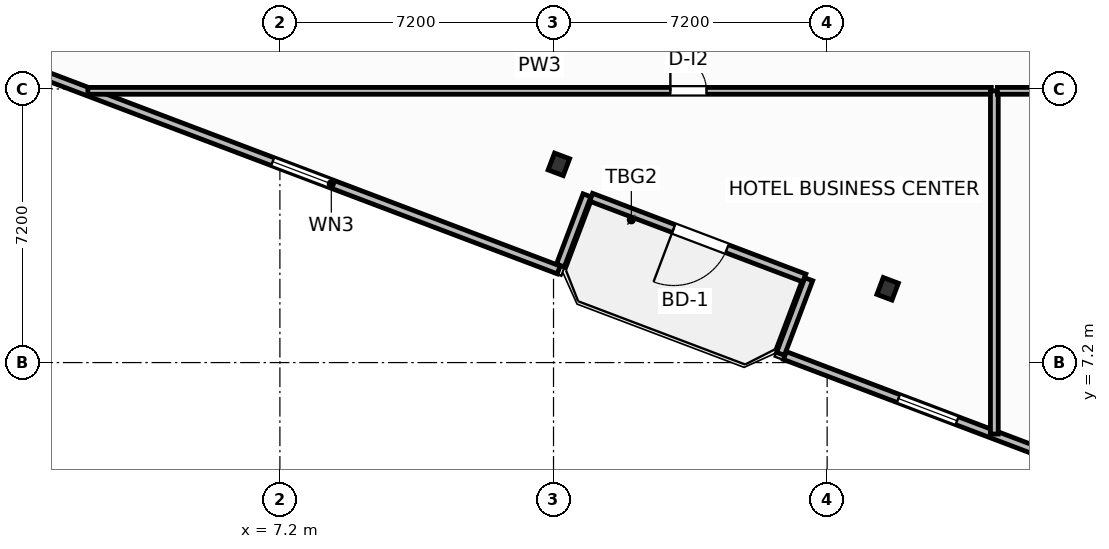
"""IFC4 building model, lengths in metres.
Left out: names, types, materials, properties, quantities, classifications, styles, units other than length and angle.
Written with IfcOpenShell. Run it as: python <this file> out.ifc"""

import sys

from ifc_helpers import new_model, si_unit, direction, frame, frame_2d, origin, origin_2d, place, context, subcontext, project, spatial, rectangle, i_section, extrude, element, fill, save


model = new_model("IFC4")
c1 = context("Model", 3, precision=1e-05, world=origin(), true_north=direction((0.0, 1.0)))
c2 = subcontext(c1, "Body", "Model", "MODEL_VIEW")
j1 = project(units=[si_unit("LENGTHUNIT", "METRE"), si_unit("PLANEANGLEUNIT", "RADIAN")], contexts=[c1])
p1 = place(None, origin())
s1 = spatial("IfcSite", under=j1, at=p1, CompositionType="ELEMENT")
p2 = place(p1, origin())
s2 = spatial("IfcBuilding", under=s1, at=p2, CompositionType="ELEMENT")
p3 = place(p2, frame((0.0, 0.0, 94.7)))
s3 = spatial("IfcBuildingStorey", under=s2, at=p3, CompositionType="ELEMENT", Elevation=94.7)
for number, where, z_axis, x_axis in (
    (1, (14.541, 12.416, 0.0), (0.0, 0.0, 1.0), (0.935, -0.354, 0.0)),
    (2, (23.192, 9.141, 0.0), (0.0, 0.0, 1.0), (0.935, -0.354, 0.0)),
):
    element("IfcColumn", number, at=place(p3, frame(where, z_axis=z_axis, x_axis=x_axis)), inside=s3, PredefinedType="COLUMN", context=c2, shape_type="SweptSolid", body=[
        extrude(i_section(OverallWidth=0.424, OverallDepth=0.474, WebThickness=0.048, FlangeThickness=0.077, FilletRadius=0.025, at=origin_2d()), origin(), (0.0, 0.0, 1.0), 3.7),
    ])
p4 = place(p3, frame((21.0, 9.425, 0.0), z_axis=(0.0, 0.0, 1.0), x_axis=(-0.93521416643, 0.354082565101, 0.0)))
e3 = element("IfcWall", 3, at=p4, inside=s3, PredefinedType="SOLIDWALL", context=c2, shape_type="SweptSolid", body=[
    extrude(rectangle(XDim=6.0, YDim=0.22, at=frame_2d((3.0, 0.0))), origin(), (0.0, 0.0, 1.0), 2.73),
])
p5 = place(p4, frame((2.176, 0.0, 0.0)))
e4 = element("IfcOpeningElement", 4, at=p5, cuts=e3, PredefinedType="OPENING", context=c2, shape_type="SweptSolid", body=[
    extrude(rectangle(XDim=1.5, YDim=2.25, at=frame_2d((0.75, 1.125))), frame((0.0, 0.12, 0.0), z_axis=(0.0, -1.0, 0.0), x_axis=(1.0, 0.0, 0.0)), (0.0, 0.0, 1.0), 0.24),
])
p6 = place(p3, frame((1.026, 14.753, 0.0), z_axis=(0.0, 0.0, 1.0), x_axis=(0.935222448475, -0.354060689526, 0.0)))
e5 = element("IfcWall", 5, at=p6, inside=s3, PredefinedType="SOLIDWALL", context=c2, shape_type="SweptSolid", body=[
    extrude(rectangle(XDim=14.447, YDim=0.22, at=frame_2d((7.224, 0.0))), origin(), (0.0, 0.0, 1.0), 2.73),
])
p7 = place(p6, frame((6.399, 0.0, 0.8)))
e6 = element("IfcOpeningElement", 6, at=p7, cuts=e5, PredefinedType="OPENING", context=c2, shape_type="SweptSolid", body=[
    extrude(rectangle(XDim=1.65, YDim=1.65, at=frame_2d((0.825, 0.825))), frame((0.0, 0.12, 0.0), z_axis=(0.0, -1.0, 0.0), x_axis=(1.0, 0.0, 0.0)), (0.0, 0.0, 1.0), 0.24),
])
p8 = place(p3, frame((14.581, 9.755, 0.0), z_axis=(0.0, 0.0, 1.0), x_axis=(0.354061611705, 0.935222099352, 0.0)))
e7 = element("IfcWall", 7, at=p8, inside=s3, PredefinedType="SOLIDWALL", context=c2, shape_type="SweptSolid", body=[
    extrude(rectangle(XDim=1.975, YDim=0.22, at=frame_2d((0.987, 0.0))), origin(), (0.0, 0.0, 1.0), 2.73),
])
p9 = place(p3, frame((21.116, 9.392, 0.0), z_axis=(0.0, 0.0, 1.0), x_axis=(-0.353988291547, -0.935249854022, 0.0)))
e8 = element("IfcWall", 8, at=p9, inside=s3, PredefinedType="SOLIDWALL", context=c2, shape_type="SweptSolid", body=[
    extrude(rectangle(XDim=2.1, YDim=0.22, at=frame_2d((1.05, 0.0))), origin(), (0.0, 0.0, 1.0), 2.73),
])
p10 = place(p3, frame((20.49, 7.384, 0.0), z_axis=(0.0, 0.0, 1.0), x_axis=(0.935230796934, -0.354038636968, 0.0)))
e9 = element("IfcWall", 9, at=p10, inside=s3, PredefinedType="SOLIDWALL", context=c2, shape_type="SweptSolid", body=[
    extrude(rectangle(XDim=8.035, YDim=0.22, at=frame_2d((4.018, 0.0))), origin(), (0.0, 0.0, 1.0), 2.73),
])
p11 = place(p10, frame((3.192, 0.0, 0.8)))
e10 = element("IfcOpeningElement", 10, at=p11, cuts=e9, PredefinedType="OPENING", context=c2, shape_type="SweptSolid", body=[
    extrude(rectangle(XDim=1.65, YDim=1.65, at=frame_2d((0.825, 0.825))), frame((0.0, 0.12, 0.0), z_axis=(0.0, -1.0, 0.0), x_axis=(1.0, 0.0, 0.0)), (0.0, 0.0, 1.0), 0.24),
])
p12 = place(p3, frame((2.146, 14.35, 0.0), z_axis=(0.0, 0.0, 1.0), x_axis=(1.0, 0.0, 0.0)))
e11 = element("IfcWall", 11, at=p12, inside=s3, PredefinedType="PARTITIONING", context=c2, shape_type="SweptSolid", body=[
    extrude(rectangle(XDim=23.774, YDim=0.18, at=frame_2d((11.887, 0.0))), origin(), (0.0, 0.0, 1.0), 3.45),
])
p13 = place(p12, frame((15.329, 0.0, 0.0)))
e12 = element("IfcOpeningElement", 12, at=p13, cuts=e11, PredefinedType="OPENING", context=c2, shape_type="SweptSolid", body=[
    extrude(rectangle(XDim=0.95, YDim=2.05, at=frame_2d((0.475, 1.025))), frame((0.0, 0.1, 0.0), z_axis=(0.0, -1.0, 0.0), x_axis=(1.0, 0.0, 0.0)), (0.0, 0.0, 1.0), 0.2),
])
p14 = place(p3, frame((26.0, 5.319, 0.0), z_axis=(0.0, 0.0, 1.0), x_axis=(0.0, 1.0, 0.0)))
e13 = element("IfcWall", 13, at=p14, inside=s3, PredefinedType="PARTITIONING", context=c2, shape_type="SweptSolid", body=[
    extrude(rectangle(XDim=9.031, YDim=0.205, at=frame_2d((4.515, 0.0))), origin(), (0.0, 0.0, 1.0), 3.45),
])
p15 = place(p3, frame((26.08, 14.35, 0.0), z_axis=(0.0, 0.0, 1.0), x_axis=(1.0, 0.0, 0.0)))
e14 = element("IfcWall", 14, at=p15, inside=s3, PredefinedType="PARTITIONING", context=c2, shape_type="SweptSolid", body=[
    extrude(rectangle(XDim=17.84, YDim=0.18, at=frame_2d((8.92, 0.0))), origin(), (0.0, 0.0, 1.0), 3.45),
])
p16 = place(p15, frame((8.445, 0.0, 0.0)))
e15 = element("IfcOpeningElement", 15, at=p16, cuts=e14, PredefinedType="OPENING", context=c2, shape_type="SweptSolid", body=[
    extrude(rectangle(XDim=0.95, YDim=2.05, at=frame_2d((0.475, 1.025))), frame((0.0, 0.1, 0.0), z_axis=(0.0, -1.0, 0.0), x_axis=(1.0, 0.0, 0.0)), (0.0, 0.0, 1.0), 0.2),
])
p17 = place(p5, origin())
e16 = element("IfcDoor", 16, at=p17, inside=s3, OperationType="SINGLE_SWING_RIGHT", PredefinedType="DOOR", context=c2, shape_type="SweptSolid", body=[
    extrude(rectangle(XDim=1.5, YDim=2.25, at=frame_2d((0.75, 1.125))), frame((0.0, 0.025, 0.0), z_axis=(0.0, -1.0, 0.0), x_axis=(1.0, 0.0, 0.0)), (0.0, 0.0, 1.0), 0.05),
])
fill(e4, e16)
p18 = place(p7, origin())
e17 = element("IfcWindow", 17, at=p18, inside=s3, PartitioningType="SINGLE_PANEL", PredefinedType="WINDOW", context=c2, shape_type="SweptSolid", body=[
    extrude(rectangle(XDim=1.65, YDim=1.65, at=frame_2d((0.825, 0.825))), frame((0.0, 0.03, 0.0), z_axis=(0.0, -1.0, 0.0), x_axis=(1.0, 0.0, 0.0)), (0.0, 0.0, 1.0), 0.06),
])
fill(e6, e17)
p19 = place(p11, origin())
e18 = element("IfcWindow", 18, at=p19, inside=s3, PartitioningType="SINGLE_PANEL", PredefinedType="WINDOW", context=c2, shape_type="SweptSolid", body=[
    extrude(rectangle(XDim=1.65, YDim=1.65, at=frame_2d((0.825, 0.825))), frame((0.0, 0.03, 0.0), z_axis=(0.0, -1.0, 0.0), x_axis=(1.0, 0.0, 0.0)), (0.0, 0.0, 1.0), 0.06),
])
fill(e10, e18)
p20 = place(p13, origin())
e19 = element("IfcDoor", 19, at=p20, inside=s3, OperationType="SINGLE_SWING_LEFT", PredefinedType="DOOR", context=c2, shape_type="SweptSolid", body=[
    extrude(rectangle(XDim=0.95, YDim=2.05, at=frame_2d((0.475, 1.025))), frame((0.0, 0.025, 0.0), z_axis=(0.0, -1.0, 0.0), x_axis=(1.0, 0.0, 0.0)), (0.0, 0.0, 1.0), 0.05),
])
fill(e12, e19)
save(model, sys.argv[1])
